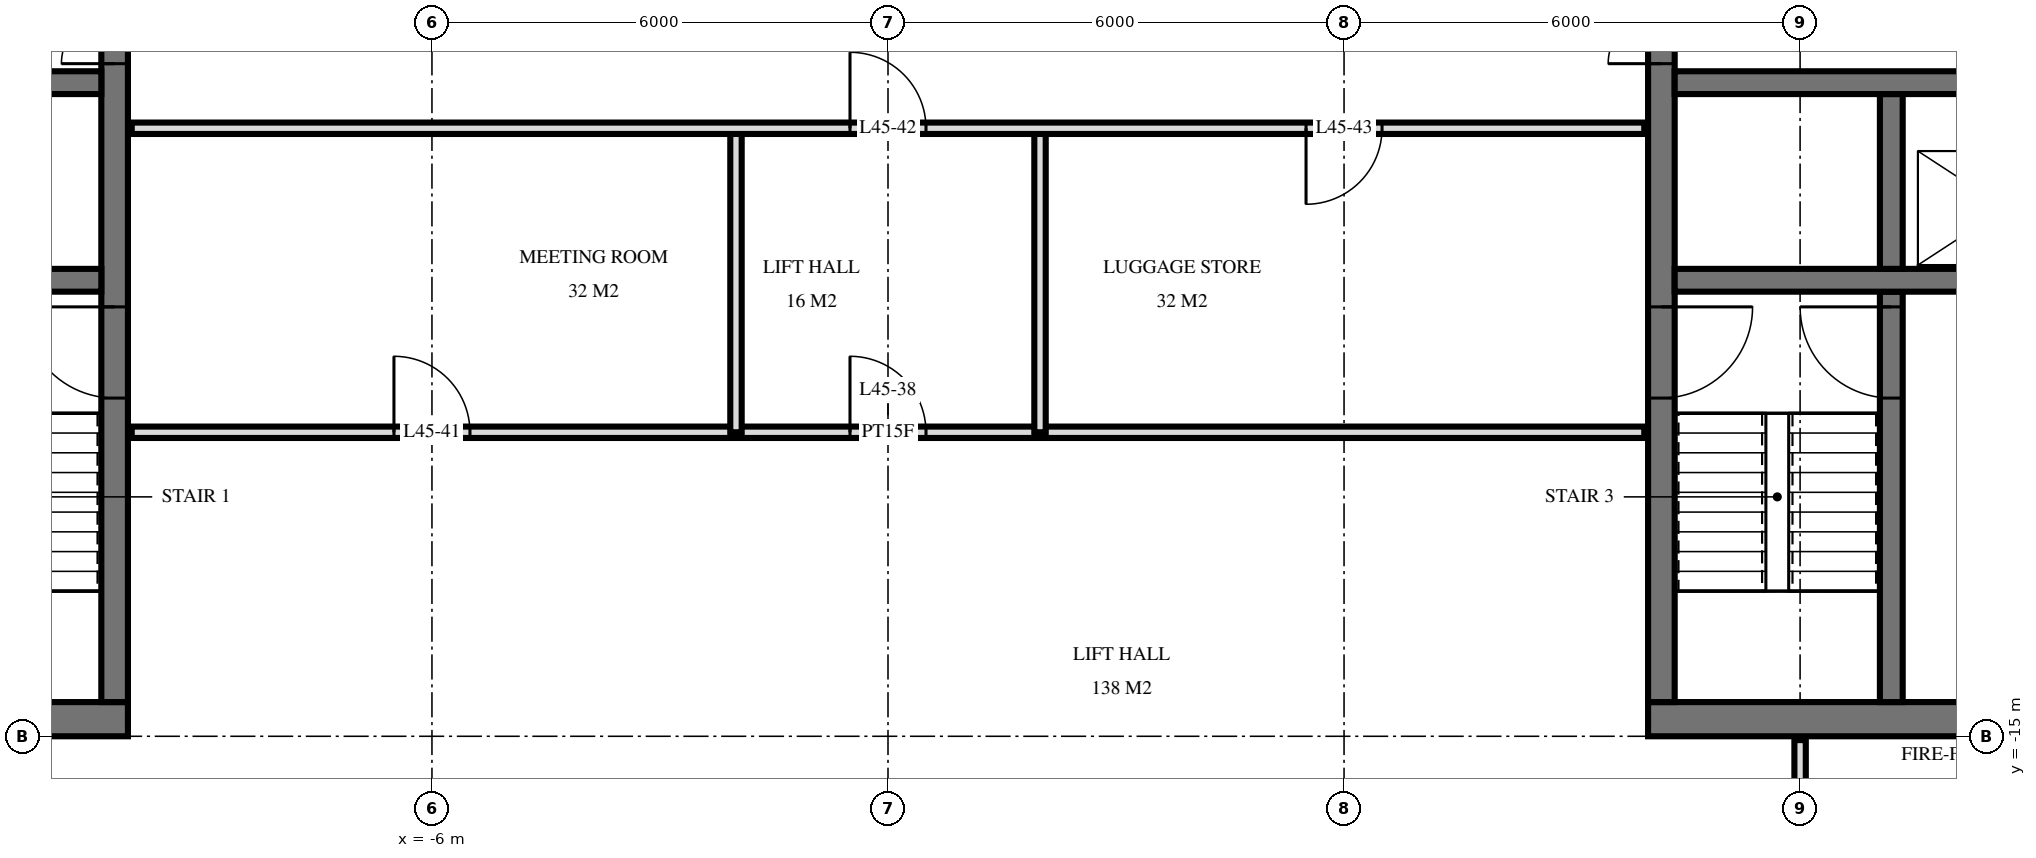
"""IFC4 building model, lengths in metres.
Left out: names, types, materials, properties, quantities, classifications, styles, units other than length and angle.
Written with IfcOpenShell. Run it as: python <this file> out.ifc"""

import sys

from ifc_helpers import new_model, si_unit, direction, frame, frame_2d, origin, place, context, subcontext, project, spatial, rectangle, extrude, element, fill, save


model = new_model("IFC4")
c1 = context("Model", 3, precision=1e-05, world=origin(), true_north=direction((0.0, 1.0)))
c2 = subcontext(c1, "Body", "Model", "MODEL_VIEW")
j1 = project(units=[si_unit("LENGTHUNIT", "METRE"), si_unit("PLANEANGLEUNIT", "RADIAN")], contexts=[c1])
p1 = place(None, origin())
s1 = spatial("IfcSite", under=j1, at=p1, CompositionType="ELEMENT")
p2 = place(p1, origin())
s2 = spatial("IfcBuilding", under=s1, at=p2, CompositionType="ELEMENT")
p3 = place(p2, frame((0.0, 0.0, 174.0)))
s3 = spatial("IfcBuildingStorey", under=s2, at=p3, CompositionType="ELEMENT", Elevation=174.0)
p4 = place(p3, frame((-24.5, -14.775, 0.0), z_axis=(0.0, 0.0, 1.0), x_axis=(1.0, 0.0, 0.0)))
e1 = element("IfcWall", 1, at=p4, inside=s3, PredefinedType="SHEAR", context=c2, shape_type="SweptSolid", body=[
    extrude(rectangle(XDim=14.5, YDim=0.45, at=frame_2d((7.25, 0.0))), origin(), (0.0, 0.0, 1.0), 3.6),
])
p5 = place(p4, frame((6.2, 0.0, 0.0)))
e2 = element("IfcOpeningElement", 2, at=p5, cuts=e1, PredefinedType="OPENING", context=c2, shape_type="SweptSolid", body=[
    extrude(rectangle(XDim=1.2, YDim=2.1, at=frame_2d((0.6, 1.05))), frame((0.0, 0.235, 0.0), z_axis=(0.0, -1.0, 0.0), x_axis=(1.0, 0.0, 0.0)), (0.0, 0.0, 1.0), 0.47),
])
p6 = place(p4, frame((9.25, 0.0, 0.0)))
e3 = element("IfcOpeningElement", 3, at=p6, cuts=e1, PredefinedType="OPENING", context=c2, shape_type="SweptSolid", body=[
    extrude(rectangle(XDim=1.1, YDim=2.1, at=frame_2d((0.55, 1.05))), frame((0.0, 0.235, 0.0), z_axis=(0.0, -1.0, 0.0), x_axis=(1.0, 0.0, 0.0)), (0.0, 0.0, 1.0), 0.47),
])
p7 = place(p4, frame((3.5, 0.0, 0.0)))
e4 = element("IfcOpeningElement", 4, at=p7, cuts=e1, PredefinedType="OPENING", context=c2, shape_type="SweptSolid", body=[
    extrude(rectangle(XDim=0.9, YDim=2.1, at=frame_2d((0.45, 1.05))), frame((0.0, 0.235, 0.0), z_axis=(0.0, -1.0, 0.0), x_axis=(1.0, 0.0, 0.0)), (0.0, 0.0, 1.0), 0.47),
])
p8 = place(p4, frame((1.05, 0.0, 0.0)))
e5 = element("IfcOpeningElement", 5, at=p8, cuts=e1, PredefinedType="OPENING", context=c2, shape_type="SweptSolid", body=[
    extrude(rectangle(XDim=1.0, YDim=2.1, at=frame_2d((0.5, 1.05))), frame((0.0, 0.235, 0.0), z_axis=(0.0, -1.0, 0.0), x_axis=(1.0, 0.0, 0.0)), (0.0, 0.0, 1.0), 0.47),
])
p9 = place(p3, frame((-10.175, -14.55, 0.0), z_axis=(0.0, 0.0, 1.0), x_axis=(0.0, 1.0, 0.0)))
e6 = element("IfcWall", 6, at=p9, inside=s3, PredefinedType="SHEAR", context=c2, shape_type="SweptSolid", body=[
    extrude(rectangle(XDim=14.1, YDim=0.35, at=frame_2d((7.05, 0.0))), origin(), (0.0, 0.0, 1.0), 3.6),
])
p10 = place(p9, frame((8.4, 0.0, 0.0)))
e7 = element("IfcOpeningElement", 7, at=p10, cuts=e6, PredefinedType="OPENING", context=c2, shape_type="SweptSolid", body=[
    extrude(rectangle(XDim=1.4, YDim=2.4, at=frame_2d((0.7, 1.2))), frame((0.0, 0.185, 0.0), z_axis=(0.0, -1.0, 0.0), x_axis=(1.0, 0.0, 0.0)), (0.0, 0.0, 1.0), 0.37),
])
p11 = place(p9, frame((10.0, 0.0, 0.0)))
e8 = element("IfcOpeningElement", 8, at=p11, cuts=e6, PredefinedType="OPENING", context=c2, shape_type="SweptSolid", body=[
    extrude(rectangle(XDim=1.4, YDim=2.4, at=frame_2d((0.7, 1.2))), frame((0.0, 0.185, 0.0), z_axis=(0.0, -1.0, 0.0), x_axis=(1.0, 0.0, 0.0)), (0.0, 0.0, 1.0), 0.37),
])
p12 = place(p9, frame((4.0, 0.0, 0.0)))
e9 = element("IfcOpeningElement", 9, at=p12, cuts=e6, PredefinedType="OPENING", context=c2, shape_type="SweptSolid", body=[
    extrude(rectangle(XDim=1.2, YDim=2.1, at=frame_2d((0.6, 1.05))), frame((0.0, 0.185, 0.0), z_axis=(0.0, -1.0, 0.0), x_axis=(1.0, 0.0, 0.0)), (0.0, 0.0, 1.0), 0.37),
])
p13 = place(p3, frame((-24.05, -6.4, 0.0), z_axis=(0.0, 0.0, 1.0), x_axis=(1.0, 0.0, 0.0)))
e10 = element("IfcWall", 10, at=p13, inside=s3, PredefinedType="SHEAR", context=c2, shape_type="SweptSolid", body=[
    extrude(rectangle(XDim=13.7, YDim=0.3, at=frame_2d((6.85, 0.0))), origin(), (0.0, 0.0, 1.0), 3.6),
])
p14 = place(p13, frame((0.55, 0.0, 0.0)))
e11 = element("IfcOpeningElement", 11, at=p14, cuts=e10, PredefinedType="OPENING", context=c2, shape_type="SweptSolid", body=[
    extrude(rectangle(XDim=1.1, YDim=2.1, at=frame_2d((0.55, 1.05))), frame((0.0, 0.16, 0.0), z_axis=(0.0, -1.0, 0.0), x_axis=(1.0, 0.0, 0.0)), (0.0, 0.0, 1.0), 0.32),
])
p15 = place(p13, frame((5.8, 0.0, 0.0)))
e12 = element("IfcOpeningElement", 12, at=p15, cuts=e10, PredefinedType="OPENING", context=c2, shape_type="SweptSolid", body=[
    extrude(rectangle(XDim=1.1, YDim=2.1, at=frame_2d((0.55, 1.05))), frame((0.0, 0.16, 0.0), z_axis=(0.0, -1.0, 0.0), x_axis=(1.0, 0.0, 0.0)), (0.0, 0.0, 1.0), 0.32),
])
p16 = place(p3, frame((-24.05, -9.0, 0.0), z_axis=(0.0, 0.0, 1.0), x_axis=(1.0, 0.0, 0.0)))
e13 = element("IfcWall", 13, at=p16, inside=s3, PredefinedType="SHEAR", context=c2, shape_type="SweptSolid", body=[
    extrude(rectangle(XDim=13.7, YDim=0.3, at=frame_2d((6.85, 0.0))), origin(), (0.0, 0.0, 1.0), 3.6),
])
p17 = place(p16, frame((8.8, 0.0, 0.0)))
e14 = element("IfcOpeningElement", 14, at=p17, cuts=e13, PredefinedType="OPENING", context=c2, shape_type="SweptSolid", body=[
    extrude(rectangle(XDim=1.1, YDim=2.1, at=frame_2d((0.55, 1.05))), frame((0.0, 0.16, 0.0), z_axis=(0.0, -1.0, 0.0), x_axis=(1.0, 0.0, 0.0)), (0.0, 0.0, 1.0), 0.32),
])
p18 = place(p3, frame((10.0, -14.775, 0.0), z_axis=(0.0, 0.0, 1.0), x_axis=(1.0, 0.0, 0.0)))
e15 = element("IfcWall", 15, at=p18, inside=s3, PredefinedType="SHEAR", context=c2, shape_type="SweptSolid", body=[
    extrude(rectangle(XDim=14.5, YDim=0.45, at=frame_2d((7.25, 0.0))), origin(), (0.0, 0.0, 1.0), 3.6),
])
p19 = place(p18, frame((7.1, 0.0, 0.0)))
e16 = element("IfcOpeningElement", 16, at=p19, cuts=e15, PredefinedType="OPENING", context=c2, shape_type="SweptSolid", body=[
    extrude(rectangle(XDim=1.2, YDim=2.1, at=frame_2d((0.6, 1.05))), frame((0.0, 0.235, 0.0), z_axis=(0.0, -1.0, 0.0), x_axis=(1.0, 0.0, 0.0)), (0.0, 0.0, 1.0), 0.47),
])
p20 = place(p18, frame((4.15, 0.0, 0.0)))
e17 = element("IfcOpeningElement", 17, at=p20, cuts=e15, PredefinedType="OPENING", context=c2, shape_type="SweptSolid", body=[
    extrude(rectangle(XDim=1.1, YDim=2.1, at=frame_2d((0.55, 1.05))), frame((0.0, 0.235, 0.0), z_axis=(0.0, -1.0, 0.0), x_axis=(1.0, 0.0, 0.0)), (0.0, 0.0, 1.0), 0.47),
])
p21 = place(p18, frame((10.1, 0.0, 0.0)))
e18 = element("IfcOpeningElement", 18, at=p21, cuts=e15, PredefinedType="OPENING", context=c2, shape_type="SweptSolid", body=[
    extrude(rectangle(XDim=0.9, YDim=2.1, at=frame_2d((0.45, 1.05))), frame((0.0, 0.235, 0.0), z_axis=(0.0, -1.0, 0.0), x_axis=(1.0, 0.0, 0.0)), (0.0, 0.0, 1.0), 0.47),
])
p22 = place(p18, frame((12.45, 0.0, 0.0)))
e19 = element("IfcOpeningElement", 19, at=p22, cuts=e15, PredefinedType="OPENING", context=c2, shape_type="SweptSolid", body=[
    extrude(rectangle(XDim=1.0, YDim=2.1, at=frame_2d((0.5, 1.05))), frame((0.0, 0.235, 0.0), z_axis=(0.0, -1.0, 0.0), x_axis=(1.0, 0.0, 0.0)), (0.0, 0.0, 1.0), 0.47),
])
p23 = place(p3, frame((10.175, -14.55, 0.0), z_axis=(0.0, 0.0, 1.0), x_axis=(0.0, 1.0, 0.0)))
e20 = element("IfcWall", 20, at=p23, inside=s3, PredefinedType="SHEAR", context=c2, shape_type="SweptSolid", body=[
    extrude(rectangle(XDim=14.1, YDim=0.35, at=frame_2d((7.05, 0.0))), origin(), (0.0, 0.0, 1.0), 3.6),
])
p24 = place(p23, frame((8.4, 0.0, 0.0)))
e21 = element("IfcOpeningElement", 21, at=p24, cuts=e20, PredefinedType="OPENING", context=c2, shape_type="SweptSolid", body=[
    extrude(rectangle(XDim=1.4, YDim=2.4, at=frame_2d((0.7, 1.2))), frame((0.0, 0.185, 0.0), z_axis=(0.0, -1.0, 0.0), x_axis=(1.0, 0.0, 0.0)), (0.0, 0.0, 1.0), 0.37),
])
p25 = place(p23, frame((10.0, 0.0, 0.0)))
e22 = element("IfcOpeningElement", 22, at=p25, cuts=e20, PredefinedType="OPENING", context=c2, shape_type="SweptSolid", body=[
    extrude(rectangle(XDim=1.4, YDim=2.4, at=frame_2d((0.7, 1.2))), frame((0.0, 0.185, 0.0), z_axis=(0.0, -1.0, 0.0), x_axis=(1.0, 0.0, 0.0)), (0.0, 0.0, 1.0), 0.37),
])
p26 = place(p23, frame((4.0, 0.0, 0.0)))
e23 = element("IfcOpeningElement", 23, at=p26, cuts=e20, PredefinedType="OPENING", context=c2, shape_type="SweptSolid", body=[
    extrude(rectangle(XDim=1.2, YDim=2.1, at=frame_2d((0.6, 1.05))), frame((0.0, 0.185, 0.0), z_axis=(0.0, -1.0, 0.0), x_axis=(1.0, 0.0, 0.0)), (0.0, 0.0, 1.0), 0.37),
])
p27 = place(p3, frame((10.35, -6.4, 0.0), z_axis=(0.0, 0.0, 1.0), x_axis=(1.0, 0.0, 0.0)))
e24 = element("IfcWall", 24, at=p27, inside=s3, PredefinedType="SHEAR", context=c2, shape_type="SweptSolid", body=[
    extrude(rectangle(XDim=13.7, YDim=0.3, at=frame_2d((6.85, 0.0))), origin(), (0.0, 0.0, 1.0), 3.6),
])
p28 = place(p27, frame((12.05, 0.0, 0.0)))
e25 = element("IfcOpeningElement", 25, at=p28, cuts=e24, PredefinedType="OPENING", context=c2, shape_type="SweptSolid", body=[
    extrude(rectangle(XDim=1.1, YDim=2.1, at=frame_2d((0.55, 1.05))), frame((0.0, 0.16, 0.0), z_axis=(0.0, -1.0, 0.0), x_axis=(1.0, 0.0, 0.0)), (0.0, 0.0, 1.0), 0.32),
])
p29 = place(p27, frame((6.8, 0.0, 0.0)))
e26 = element("IfcOpeningElement", 26, at=p29, cuts=e24, PredefinedType="OPENING", context=c2, shape_type="SweptSolid", body=[
    extrude(rectangle(XDim=1.1, YDim=2.1, at=frame_2d((0.55, 1.05))), frame((0.0, 0.16, 0.0), z_axis=(0.0, -1.0, 0.0), x_axis=(1.0, 0.0, 0.0)), (0.0, 0.0, 1.0), 0.32),
])
p30 = place(p3, frame((10.35, -9.0, 0.0), z_axis=(0.0, 0.0, 1.0), x_axis=(1.0, 0.0, 0.0)))
e27 = element("IfcWall", 27, at=p30, inside=s3, PredefinedType="SHEAR", context=c2, shape_type="SweptSolid", body=[
    extrude(rectangle(XDim=13.7, YDim=0.3, at=frame_2d((6.85, 0.0))), origin(), (0.0, 0.0, 1.0), 3.6),
])
p31 = place(p30, frame((3.8, 0.0, 0.0)))
e28 = element("IfcOpeningElement", 28, at=p31, cuts=e27, PredefinedType="OPENING", context=c2, shape_type="SweptSolid", body=[
    extrude(rectangle(XDim=1.1, YDim=2.1, at=frame_2d((0.55, 1.05))), frame((0.0, 0.16, 0.0), z_axis=(0.0, -1.0, 0.0), x_axis=(1.0, 0.0, 0.0)), (0.0, 0.0, 1.0), 0.32),
])
p32 = place(p3, frame((13.2, -8.85, 0.0), z_axis=(0.0, 0.0, 1.0), x_axis=(0.0, 1.0, 0.0)))
e29 = element("IfcWall", 29, at=p32, inside=s3, PredefinedType="SHEAR", context=c2, shape_type="SweptSolid", body=[
    extrude(rectangle(XDim=2.3, YDim=0.3, at=frame_2d((1.15, 0.0))), origin(), (0.0, 0.0, 1.0), 3.6),
])
p33 = place(p3, frame((13.2, -14.55, 0.0), z_axis=(0.0, 0.0, 1.0), x_axis=(0.0, 1.0, 0.0)))
e30 = element("IfcWall", 30, at=p33, inside=s3, PredefinedType="SHEAR", context=c2, shape_type="SweptSolid", body=[
    extrude(rectangle(XDim=5.4, YDim=0.3, at=frame_2d((2.7, 0.0))), origin(), (0.0, 0.0, 1.0), 3.6),
])
p34 = place(p33, frame((4.0, 0.0, 0.0)))
e31 = element("IfcOpeningElement", 31, at=p34, cuts=e30, PredefinedType="OPENING", context=c2, shape_type="SweptSolid", body=[
    extrude(rectangle(XDim=1.2, YDim=2.1, at=frame_2d((0.6, 1.05))), frame((0.0, 0.16, 0.0), z_axis=(0.0, -1.0, 0.0), x_axis=(1.0, 0.0, 0.0)), (0.0, 0.0, 1.0), 0.32),
])
p35 = place(p3, frame((12.0, -17.4, 0.0), z_axis=(0.0, 0.0, 1.0), x_axis=(0.0, 1.0, 0.0)))
e32 = element("IfcWall", 32, at=p35, inside=s3, PredefinedType="PARTITIONING", context=c2, shape_type="SweptSolid", body=[
    extrude(rectangle(XDim=2.35, YDim=0.15, at=frame_2d((1.175, 0.0))), origin(), (0.0, 0.0, 1.0), 3.32),
])
p36 = place(p35, frame((0.7, 0.0, 0.0)))
e33 = element("IfcOpeningElement", 33, at=p36, cuts=e32, PredefinedType="OPENING", context=c2, shape_type="SweptSolid", body=[
    extrude(rectangle(XDim=1.0, YDim=2.1, at=frame_2d((0.5, 1.05))), frame((0.0, 0.085, 0.0), z_axis=(0.0, -1.0, 0.0), x_axis=(1.0, 0.0, 0.0)), (0.0, 0.0, 1.0), 0.17),
])
for number, where, z_axis, x_axis in (
    (34, (2.0, -11.0, 0.0), (0.0, 0.0, 1.0), (0.0, 1.0, 0.0)),
    (35, (-2.0, -11.0, 0.0), (0.0, 0.0, 1.0), (0.0, 1.0, 0.0)),
):
    element("IfcWall", number, at=place(p3, frame(where, z_axis=z_axis, x_axis=x_axis)), inside=s3, PredefinedType="PARTITIONING", context=c2, shape_type="SweptSolid", body=[
        extrude(rectangle(XDim=4.0, YDim=0.15, at=frame_2d((2.0, 0.0))), origin(), (0.0, 0.0, 1.0), 3.32),
    ])
p37 = place(p3, frame((-9.95, -11.0, 0.0), z_axis=(0.0, 0.0, 1.0), x_axis=(1.0, 0.0, 0.0)))
e36 = element("IfcWall", 36, at=p37, inside=s3, PredefinedType="PARTITIONING", context=c2, shape_type="SweptSolid", body=[
    extrude(rectangle(XDim=19.9, YDim=0.15, at=frame_2d((9.95, 0.0))), origin(), (0.0, 0.0, 1.0), 3.32),
])
p38 = place(p37, frame((9.45, 0.0, 0.0)))
e37 = element("IfcOpeningElement", 37, at=p38, cuts=e36, PredefinedType="OPENING", context=c2, shape_type="SweptSolid", body=[
    extrude(rectangle(XDim=1.0, YDim=2.1, at=frame_2d((0.5, 1.05))), frame((0.0, 0.085, 0.0), z_axis=(0.0, -1.0, 0.0), x_axis=(1.0, 0.0, 0.0)), (0.0, 0.0, 1.0), 0.17),
])
p39 = place(p37, frame((3.45, 0.0, 0.0)))
e38 = element("IfcOpeningElement", 38, at=p39, cuts=e36, PredefinedType="OPENING", context=c2, shape_type="SweptSolid", body=[
    extrude(rectangle(XDim=1.0, YDim=2.1, at=frame_2d((0.5, 1.05))), frame((0.0, 0.085, 0.0), z_axis=(0.0, -1.0, 0.0), x_axis=(1.0, 0.0, 0.0)), (0.0, 0.0, 1.0), 0.17),
])
p40 = place(p3, frame((-9.95, -7.0, 0.0), z_axis=(0.0, 0.0, 1.0), x_axis=(1.0, 0.0, 0.0)))
e39 = element("IfcWall", 39, at=p40, inside=s3, PredefinedType="PARTITIONING", context=c2, shape_type="SweptSolid", body=[
    extrude(rectangle(XDim=19.9, YDim=0.15, at=frame_2d((9.95, 0.0))), origin(), (0.0, 0.0, 1.0), 3.32),
])
p41 = place(p40, frame((9.45, 0.0, 0.0)))
e40 = element("IfcOpeningElement", 40, at=p41, cuts=e39, PredefinedType="OPENING", context=c2, shape_type="SweptSolid", body=[
    extrude(rectangle(XDim=1.0, YDim=2.1, at=frame_2d((0.5, 1.05))), frame((0.0, 0.085, 0.0), z_axis=(0.0, -1.0, 0.0), x_axis=(1.0, 0.0, 0.0)), (0.0, 0.0, 1.0), 0.17),
])
p42 = place(p40, frame((15.45, 0.0, 0.0)))
e41 = element("IfcOpeningElement", 41, at=p42, cuts=e39, PredefinedType="OPENING", context=c2, shape_type="SweptSolid", body=[
    extrude(rectangle(XDim=1.0, YDim=2.1, at=frame_2d((0.5, 1.05))), frame((0.0, 0.085, 0.0), z_axis=(0.0, -1.0, 0.0), x_axis=(1.0, 0.0, 0.0)), (0.0, 0.0, 1.0), 0.17),
])
p43 = place(p10, origin())
e42 = element("IfcDoor", 42, at=p43, inside=s3, OperationType="DOUBLE_DOOR_SINGLE_SWING", PredefinedType="DOOR", context=c2, shape_type="SweptSolid", body=[
    extrude(rectangle(XDim=1.4, YDim=2.4, at=frame_2d((0.7, 1.2))), frame((0.0, 0.025, 0.0), z_axis=(0.0, -1.0, 0.0), x_axis=(1.0, 0.0, 0.0)), (0.0, 0.0, 1.0), 0.05),
])
fill(e7, e42)
p44 = place(p12, origin())
e43 = element("IfcDoor", 43, at=p44, inside=s3, OperationType="SINGLE_SWING_LEFT", PredefinedType="DOOR", context=c2, shape_type="SweptSolid", body=[
    extrude(rectangle(XDim=1.2, YDim=2.1, at=frame_2d((0.6, 1.05))), frame((0.0, 0.025, 0.0), z_axis=(0.0, -1.0, 0.0), x_axis=(1.0, 0.0, 0.0)), (0.0, 0.0, 1.0), 0.05),
])
fill(e9, e43)
p45 = place(p24, origin())
e44 = element("IfcDoor", 44, at=p45, inside=s3, OperationType="DOUBLE_DOOR_SINGLE_SWING", PredefinedType="DOOR", context=c2, shape_type="SweptSolid", body=[
    extrude(rectangle(XDim=1.4, YDim=2.4, at=frame_2d((0.7, 1.2))), frame((0.0, 0.025, 0.0), z_axis=(0.0, -1.0, 0.0), x_axis=(1.0, 0.0, 0.0)), (0.0, 0.0, 1.0), 0.05),
])
fill(e21, e44)
p46 = place(p26, frame((0.6, 0.0, 0.0), z_axis=(0.0, 0.0, 1.0), x_axis=(-1.0, 0.0, 0.0)))
e45 = element("IfcDoor", 45, at=p46, inside=s3, OperationType="SINGLE_SWING_RIGHT", PredefinedType="DOOR", context=c2, shape_type="SweptSolid", body=[
    extrude(rectangle(XDim=1.2, YDim=2.1, at=frame_2d((0.0, 1.05))), frame((0.0, -0.025, 0.0), z_axis=(0.0, 1.0, 0.0), x_axis=(-1.0, 0.0, 0.0)), (0.0, 0.0, 1.0), 0.05),
])
fill(e23, e45)
p47 = place(p34, origin())
e46 = element("IfcDoor", 46, at=p47, inside=s3, OperationType="SINGLE_SWING_LEFT", PredefinedType="DOOR", context=c2, shape_type="SweptSolid", body=[
    extrude(rectangle(XDim=1.2, YDim=2.1, at=frame_2d((0.6, 1.05))), frame((0.0, 0.025, 0.0), z_axis=(0.0, -1.0, 0.0), x_axis=(1.0, 0.0, 0.0)), (0.0, 0.0, 1.0), 0.05),
])
fill(e31, e46)
p48 = place(p38, origin())
e47 = element("IfcDoor", 47, at=p48, inside=s3, OperationType="SINGLE_SWING_RIGHT", PredefinedType="DOOR", context=c2, shape_type="SweptSolid", body=[
    extrude(rectangle(XDim=1.0, YDim=2.1, at=frame_2d((0.5, 1.05))), frame((0.0, 0.025, 0.0), z_axis=(0.0, -1.0, 0.0), x_axis=(1.0, 0.0, 0.0)), (0.0, 0.0, 1.0), 0.05),
])
fill(e37, e47)
p49 = place(p39, origin())
e48 = element("IfcDoor", 48, at=p49, inside=s3, OperationType="SINGLE_SWING_RIGHT", PredefinedType="DOOR", context=c2, shape_type="SweptSolid", body=[
    extrude(rectangle(XDim=1.0, YDim=2.1, at=frame_2d((0.5, 1.05))), frame((0.0, 0.025, 0.0), z_axis=(0.0, -1.0, 0.0), x_axis=(1.0, 0.0, 0.0)), (0.0, 0.0, 1.0), 0.05),
])
fill(e38, e48)
p50 = place(p41, origin())
e49 = element("IfcDoor", 49, at=p50, inside=s3, OperationType="SINGLE_SWING_RIGHT", PredefinedType="DOOR", context=c2, shape_type="SweptSolid", body=[
    extrude(rectangle(XDim=1.0, YDim=2.1, at=frame_2d((0.5, 1.05))), frame((0.0, 0.025, 0.0), z_axis=(0.0, -1.0, 0.0), x_axis=(1.0, 0.0, 0.0)), (0.0, 0.0, 1.0), 0.05),
])
fill(e40, e49)
p51 = place(p42, frame((0.5, 0.0, 0.0), z_axis=(0.0, 0.0, 1.0), x_axis=(-1.0, 0.0, 0.0)))
e50 = element("IfcDoor", 50, at=p51, inside=s3, OperationType="SINGLE_SWING_LEFT", PredefinedType="DOOR", context=c2, shape_type="SweptSolid", body=[
    extrude(rectangle(XDim=1.0, YDim=2.1, at=frame_2d((0.0, 1.05))), frame((0.0, -0.025, 0.0), z_axis=(0.0, 1.0, 0.0), x_axis=(-1.0, 0.0, 0.0)), (0.0, 0.0, 1.0), 0.05),
])
fill(e41, e50)
save(model, sys.argv[1])
